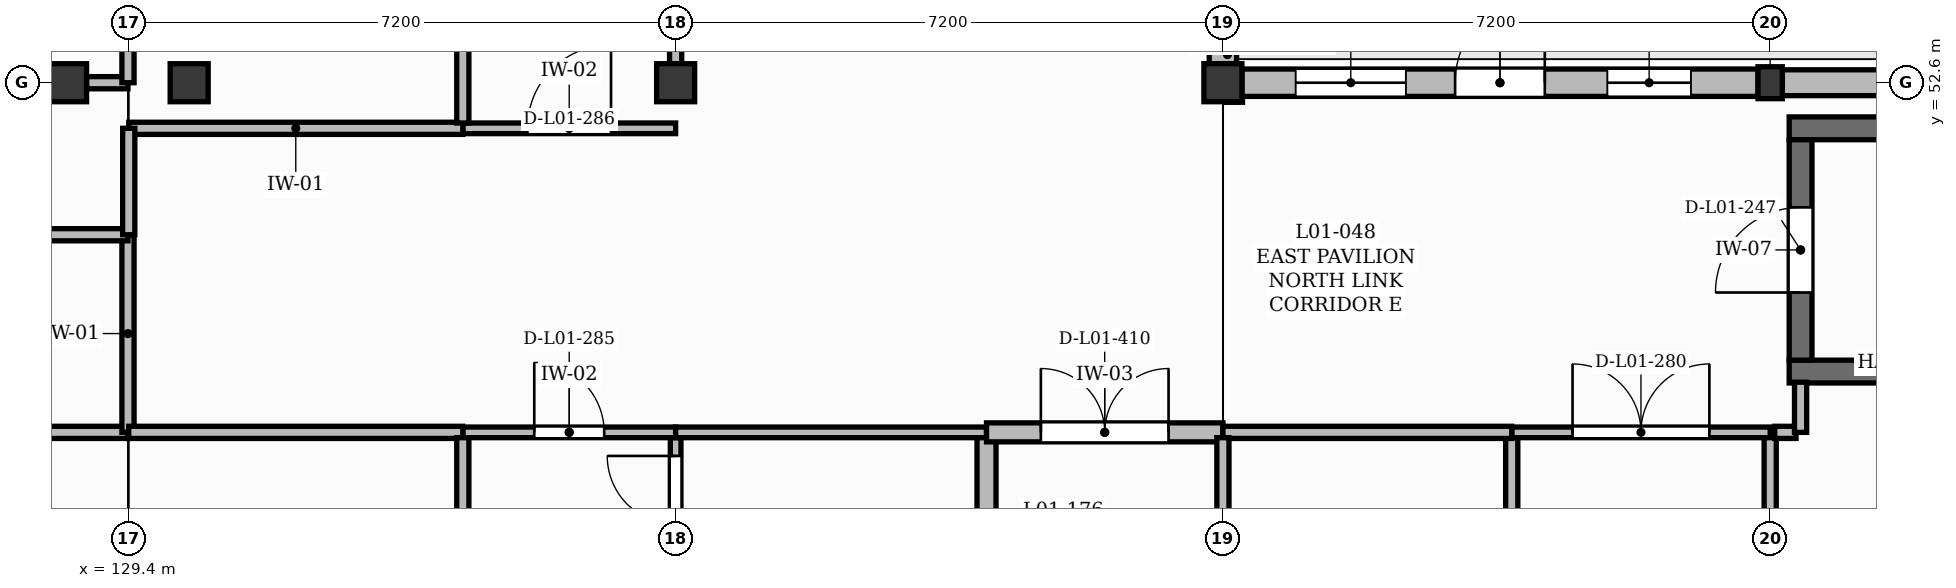
"""IFC4 building model, lengths in metres.
Left out: names, types, materials, properties, quantities, classifications, styles, units other than length and angle.
Written with IfcOpenShell. Run it as: python <this file> out.ifc"""

import sys

from ifc_helpers import new_model, si_unit, direction, frame, frame_2d, origin, origin_2d, place, context, subcontext, project, spatial, rectangle, extrude, element, fill, save


model = new_model("IFC4")
c1 = context("Model", 3, precision=1e-05, world=origin(), true_north=direction((0.0, 1.0)))
c2 = subcontext(c1, "Body", "Model", "MODEL_VIEW")
j1 = project(units=[si_unit("LENGTHUNIT", "METRE"), si_unit("PLANEANGLEUNIT", "RADIAN")], contexts=[c1])
p1 = place(None, origin())
s1 = spatial("IfcSite", under=j1, at=p1, CompositionType="ELEMENT")
p2 = place(p1, origin())
s2 = spatial("IfcBuilding", under=s1, at=p2, CompositionType="ELEMENT")
p3 = place(p2, frame((0.0, 0.0, 4.5)))
s3 = spatial("IfcBuildingStorey", under=s2, at=p3, CompositionType="ELEMENT", Elevation=4.5)
for number, where, z_axis, x_axis in (
    (1, (128.6, 52.6, 0.0), (0.0, 0.0, 1.0), (1.0, 0.0, 0.0)),
    (2, (130.2, 52.6, 0.0), (0.0, 0.0, 1.0), (1.0, 0.0, 0.0)),
    (3, (136.6, 52.6, 0.0), (0.0, 0.0, 1.0), (1.0, 0.0, 0.0)),
    (4, (143.8, 52.6, 0.0), (0.0, 0.0, 1.0), (1.0, 0.0, 0.0)),
):
    element("IfcColumn", number, at=place(p3, frame(where, z_axis=z_axis, x_axis=x_axis)), inside=s3, PredefinedType="COLUMN", context=c2, shape_type="SweptSolid", body=[
        extrude(rectangle(XDim=0.5, YDim=0.5, at=origin_2d()), origin(), (0.0, 0.0, 1.0), 4.22),
    ])
p4 = place(p3, frame((151.0, 52.6, 0.0), z_axis=(0.0, 0.0, 1.0), x_axis=(1.0, 0.0, 0.0)))
e5 = element("IfcColumn", 5, at=p4, inside=s3, PredefinedType="COLUMN", context=c2, shape_type="SweptSolid", body=[
    extrude(rectangle(XDim=0.32, YDim=0.42, at=origin_2d()), origin(), (0.0, 0.0, 1.0), 4.26),
])
p5 = place(p3, frame((143.8, 52.85, 0.0), z_axis=(0.0, 0.0, 1.0), x_axis=(0.0, 1.0, 0.0)))
e6 = element("IfcWall", 6, at=p5, inside=s3, PredefinedType="SOLIDWALL", context=c2, shape_type="SweptSolid", body=[
    extrude(rectangle(XDim=6.7, YDim=0.36, at=frame_2d((3.35, 0.0))), origin(), (0.0, 0.0, 1.0), 3.52),
])
p6 = place(p5, frame((1.9, 0.0, 1.5)))
e7 = element("IfcOpeningElement", 7, at=p6, cuts=e6, PredefinedType="OPENING", context=c2, shape_type="SweptSolid", body=[
    extrude(rectangle(XDim=1.5, YDim=1.25, at=frame_2d((0.75, 0.625))), frame((0.0, 0.19, 0.0), z_axis=(0.0, -1.0, 0.0), x_axis=(1.0, 0.0, 0.0)), (0.0, 0.0, 1.0), 0.38),
])
p7 = place(p5, frame((4.64, 0.0, 1.35)))
e8 = element("IfcOpeningElement", 8, at=p7, cuts=e6, PredefinedType="OPENING", context=c2, shape_type="SweptSolid", body=[
    extrude(rectangle(XDim=1.25, YDim=1.4, at=frame_2d((0.625, 0.7))), frame((0.0, 0.19, 0.0), z_axis=(0.0, -1.0, 0.0), x_axis=(1.0, 0.0, 0.0)), (0.0, 0.0, 1.0), 0.38),
])
p8 = place(p3, frame((144.05, 52.6, 0.0), z_axis=(0.0, 0.0, 1.0), x_axis=(1.0, 0.0, 0.0)))
e9 = element("IfcWall", 9, at=p8, inside=s3, PredefinedType="SOLIDWALL", context=c2, shape_type="SweptSolid", body=[
    extrude(rectangle(XDim=6.79, YDim=0.36, at=frame_2d((3.395, 0.0))), origin(), (0.0, 0.0, 1.0), 3.76),
])
p9 = place(p8, frame((2.805, 0.0, 0.0)))
e10 = element("IfcOpeningElement", 10, at=p9, cuts=e9, PredefinedType="OPENING", context=c2, shape_type="SweptSolid", body=[
    extrude(rectangle(XDim=1.18, YDim=2.2, at=frame_2d((0.59, 1.1))), frame((0.0, 0.19, 0.0), z_axis=(0.0, -1.0, 0.0), x_axis=(1.0, 0.0, 0.0)), (0.0, 0.0, 1.0), 0.38),
])
p10 = place(p8, frame((0.708, 0.0, 1.35)))
e11 = element("IfcOpeningElement", 11, at=p10, cuts=e9, PredefinedType="OPENING", context=c2, shape_type="SweptSolid", body=[
    extrude(rectangle(XDim=1.45, YDim=1.4, at=frame_2d((0.725, 0.7))), frame((0.0, 0.19, 0.0), z_axis=(0.0, -1.0, 0.0), x_axis=(1.0, 0.0, 0.0)), (0.0, 0.0, 1.0), 0.38),
])
p11 = place(p8, frame((4.808, 0.0, 1.0)))
e12 = element("IfcOpeningElement", 12, at=p11, cuts=e9, PredefinedType="OPENING", context=c2, shape_type="SweptSolid", body=[
    extrude(rectangle(XDim=1.1, YDim=2.2, at=frame_2d((0.55, 1.1))), frame((0.0, 0.19, 0.0), z_axis=(0.0, -1.0, 0.0), x_axis=(1.0, 0.0, 0.0)), (0.0, 0.0, 1.0), 0.38),
])
p12 = place(p3, frame((151.16, 52.6, 0.0), z_axis=(0.0, 0.0, 1.0), x_axis=(1.0, 0.0, 0.0)))
e13 = element("IfcWall", 13, at=p12, inside=s3, PredefinedType="SOLIDWALL", context=c2, shape_type="SweptSolid", body=[
    extrude(rectangle(XDim=6.86, YDim=0.34, at=frame_2d((3.43, 0.0))), origin(), (0.0, 0.0, 1.0), 3.8),
])
for number, where, z_axis, x_axis in (
    (14, (151.25, 48.8, 0.0), (0.0, 0.0, 1.0), (1.0, 0.0, 0.0)),
    (15, (151.25, 52.0, 0.0), (0.0, 0.0, 1.0), (1.0, 0.0, 0.0)),
):
    element("IfcWall", number, at=place(p3, frame(where, z_axis=z_axis, x_axis=x_axis)), inside=s3, PredefinedType="SHEAR", context=c2, shape_type="SweptSolid", body=[
        extrude(rectangle(XDim=6.7, YDim=0.3, at=frame_2d((3.35, 0.0))), origin(), (0.0, 0.0, 1.0), 4.25),
    ])
p13 = place(p3, frame((151.4, 48.95, 0.0), z_axis=(0.0, 0.0, 1.0), x_axis=(0.0, 1.0, 0.0)))
e16 = element("IfcWall", 16, at=p13, inside=s3, PredefinedType="SHEAR", context=c2, shape_type="SweptSolid", body=[
    extrude(rectangle(XDim=2.9, YDim=0.3, at=frame_2d((1.45, 0.0))), origin(), (0.0, 0.0, 1.0), 4.25),
])
p14 = place(p13, frame((0.89, 0.0, 0.0)))
e17 = element("IfcOpeningElement", 17, at=p14, cuts=e16, PredefinedType="OPENING", context=c2, shape_type="SweptSolid", body=[
    extrude(rectangle(XDim=1.12, YDim=2.1, at=frame_2d((0.56, 1.05))), frame((0.0, 0.16, 0.0), z_axis=(0.0, -1.0, 0.0), x_axis=(1.0, 0.0, 0.0)), (0.0, 0.0, 1.0), 0.32),
])
p15 = place(p3, frame((133.8, 48.0, 0.0), z_axis=(0.0, 0.0, 1.0), x_axis=(1.0, 0.0, 0.0)))
e18 = element("IfcWall", 18, at=p15, inside=s3, PredefinedType="PARTITIONING", context=c2, shape_type="SweptSolid", body=[
    extrude(rectangle(XDim=2.8, YDim=0.14, at=frame_2d((1.4, 0.0))), origin(), (0.0, 0.0, 1.0), 4.18),
])
p16 = place(p15, frame((0.94, 0.0, 0.0)))
e19 = element("IfcOpeningElement", 19, at=p16, cuts=e18, PredefinedType="OPENING", context=c2, shape_type="SweptSolid", body=[
    extrude(rectangle(XDim=0.92, YDim=2.1, at=frame_2d((0.46, 1.05))), frame((0.0, 0.08, 0.0), z_axis=(0.0, -1.0, 0.0), x_axis=(1.0, 0.0, 0.0)), (0.0, 0.0, 1.0), 0.16),
])
p17 = place(p3, frame((133.8, 52.0, 0.0), z_axis=(0.0, 0.0, 1.0), x_axis=(1.0, 0.0, 0.0)))
e20 = element("IfcWall", 20, at=p17, inside=s3, PredefinedType="PARTITIONING", context=c2, shape_type="SweptSolid", body=[
    extrude(rectangle(XDim=2.8, YDim=0.14, at=frame_2d((1.4, 0.0))), origin(), (0.0, 0.0, 1.0), 4.18),
])
p18 = place(p17, frame((0.85, 0.0, 0.0)))
e21 = element("IfcOpeningElement", 21, at=p18, cuts=e20, PredefinedType="OPENING", context=c2, shape_type="SweptSolid", body=[
    extrude(rectangle(XDim=1.1, YDim=2.1, at=frame_2d((0.55, 1.05))), frame((0.0, 0.08, 0.0), z_axis=(0.0, -1.0, 0.0), x_axis=(1.0, 0.0, 0.0)), (0.0, 0.0, 1.0), 0.16),
])
p19 = place(p3, frame((136.6, 45.65, 0.0), z_axis=(0.0, 0.0, 1.0), x_axis=(0.0, 1.0, 0.0)))
e22 = element("IfcWall", 22, at=p19, inside=s3, PredefinedType="PARTITIONING", context=c2, shape_type="SweptSolid", body=[
    extrude(rectangle(XDim=2.28, YDim=0.14, at=frame_2d((1.14, 0.0))), origin(), (0.0, 0.0, 1.0), 3.52),
])
p20 = place(p19, frame((0.24, 0.0, 0.0)))
e23 = element("IfcOpeningElement", 23, at=p20, cuts=e22, PredefinedType="OPENING", context=c2, shape_type="SweptSolid", body=[
    extrude(rectangle(XDim=1.8, YDim=2.3, at=frame_2d((0.9, 1.15))), frame((0.0, 0.08, 0.0), z_axis=(0.0, -1.0, 0.0), x_axis=(1.0, 0.0, 0.0)), (0.0, 0.0, 1.0), 0.16),
])
p21 = place(p3, frame((136.6, 48.0, 0.0), z_axis=(0.0, 0.0, 1.0), x_axis=(1.0, 0.0, 0.0)))
e24 = element("IfcWall", 24, at=p21, inside=s3, PredefinedType="PARTITIONING", context=c2, shape_type="SweptSolid", body=[
    extrude(rectangle(XDim=4.09, YDim=0.14, at=frame_2d((2.045, 0.0))), origin(), (0.0, 0.0, 1.0), 4.18),
])
p22 = place(p3, frame((140.69, 45.47, 0.0), z_axis=(0.0, 0.0, 1.0), x_axis=(0.0, 1.0, 0.0)))
e25 = element("IfcWall", 25, at=p22, inside=s3, PredefinedType="SOLIDWALL", context=c2, shape_type="SweptSolid", body=[
    extrude(rectangle(XDim=2.46, YDim=0.25, at=frame_2d((1.23, 0.0))), origin(), (0.0, 0.0, 1.0), 4.18),
])
p23 = place(p3, frame((140.69, 48.0, 0.0), z_axis=(0.0, 0.0, 1.0), x_axis=(1.0, 0.0, 0.0)))
e26 = element("IfcWall", 26, at=p23, inside=s3, PredefinedType="SOLIDWALL", context=c2, shape_type="SweptSolid", body=[
    extrude(rectangle(XDim=3.11, YDim=0.25, at=frame_2d((1.555, 0.0))), origin(), (0.0, 0.0, 1.0), 4.18),
])
p24 = place(p23, frame((0.715, 0.0, 0.0)))
e27 = element("IfcOpeningElement", 27, at=p24, cuts=e26, PredefinedType="OPENING", context=c2, shape_type="SweptSolid", body=[
    extrude(rectangle(XDim=1.68, YDim=2.3, at=frame_2d((0.84, 1.15))), frame((0.0, 0.135, 0.0), z_axis=(0.0, -1.0, 0.0), x_axis=(1.0, 0.0, 0.0)), (0.0, 0.0, 1.0), 0.27),
])
p25 = place(p3, frame((147.6, 48.0, 0.0), z_axis=(0.0, 0.0, 1.0), x_axis=(1.0, 0.0, 0.0)))
e28 = element("IfcWall", 28, at=p25, inside=s3, PredefinedType="PARTITIONING", context=c2, shape_type="SweptSolid", body=[
    extrude(rectangle(XDim=3.4, YDim=0.14, at=frame_2d((1.7, 0.0))), origin(), (0.0, 0.0, 1.0), 4.18),
])
p26 = place(p25, frame((0.8, 0.0, 0.0)))
e29 = element("IfcOpeningElement", 29, at=p26, cuts=e28, PredefinedType="OPENING", context=c2, shape_type="SweptSolid", body=[
    extrude(rectangle(XDim=1.8, YDim=2.3, at=frame_2d((0.9, 1.15))), frame((0.0, 0.08, 0.0), z_axis=(0.0, -1.0, 0.0), x_axis=(1.0, 0.0, 0.0)), (0.0, 0.0, 1.0), 0.16),
])
p27 = place(p3, frame((151.0, 45.58, 0.0), z_axis=(0.0, 0.0, 1.0), x_axis=(0.0, 1.0, 0.0)))
e30 = element("IfcWall", 30, at=p27, inside=s3, PredefinedType="PARTITIONING", context=c2, shape_type="SweptSolid", body=[
    extrude(rectangle(XDim=2.35, YDim=0.16, at=frame_2d((1.175, 0.0))), origin(), (0.0, 0.0, 1.0), 3.74),
])
p28 = place(p3, frame((147.6, 45.4, 0.0), z_axis=(0.0, 0.0, 1.0), x_axis=(0.0, 1.0, 0.0)))
e31 = element("IfcWall", 31, at=p28, inside=s3, PredefinedType="PARTITIONING", context=c2, shape_type="SweptSolid", body=[
    extrude(rectangle(XDim=2.53, YDim=0.16, at=frame_2d((1.265, 0.0))), origin(), (0.0, 0.0, 1.0), 4.18),
])
p29 = place(p3, frame((124.6, 48.0, 0.0), z_axis=(0.0, 0.0, 1.0), x_axis=(1.0, 0.0, 0.0)))
e32 = element("IfcWall", 32, at=p29, inside=s3, PredefinedType="PARTITIONING", context=c2, shape_type="SweptSolid", body=[
    extrude(rectangle(XDim=4.795, YDim=0.16, at=frame_2d((2.397, 0.0))), origin(), (0.0, 0.0, 1.0), 4.18),
])
p30 = place(p3, frame((129.395, 48.0, 0.0), z_axis=(0.0, 0.0, 1.0), x_axis=(0.0, 1.0, 0.0)))
e33 = element("IfcWall", 33, at=p30, inside=s3, PredefinedType="PARTITIONING", context=c2, shape_type="SweptSolid", body=[
    extrude(rectangle(XDim=2.6, YDim=0.16, at=frame_2d((1.3, 0.0))), origin(), (0.0, 0.0, 1.0), 4.18),
])
p31 = place(p3, frame((129.395, 50.6, 0.0), z_axis=(0.0, 0.0, 1.0), x_axis=(-1.0, 0.0, 0.0)))
e34 = element("IfcWall", 34, at=p31, inside=s3, PredefinedType="PARTITIONING", context=c2, shape_type="SweptSolid", body=[
    extrude(rectangle(XDim=4.795, YDim=0.16, at=frame_2d((2.397, 0.0))), origin(), (0.0, 0.0, 1.0), 4.18),
])
p32 = place(p3, frame((129.405, 48.0, 0.0), z_axis=(0.0, 0.0, 1.0), x_axis=(1.0, 0.0, 0.0)))
e35 = element("IfcWall", 35, at=p32, inside=s3, PredefinedType="PARTITIONING", context=c2, shape_type="SweptSolid", body=[
    extrude(rectangle(XDim=4.395, YDim=0.16, at=frame_2d((2.198, 0.0))), origin(), (0.0, 0.0, 1.0), 4.18),
])
p33 = place(p3, frame((143.8, 48.0, 0.0), z_axis=(0.0, 0.0, 1.0), x_axis=(1.0, 0.0, 0.0)))
e36 = element("IfcWall", 36, at=p33, inside=s3, PredefinedType="PARTITIONING", context=c2, shape_type="SweptSolid", body=[
    extrude(rectangle(XDim=3.8, YDim=0.16, at=frame_2d((1.9, 0.0))), origin(), (0.0, 0.0, 1.0), 4.18),
])
p34 = place(p3, frame((151.06, 48.0, 0.0), z_axis=(0.0, 0.0, 1.0), x_axis=(1.0, 0.0, 0.0)))
e37 = element("IfcWall", 37, at=p34, inside=s3, PredefinedType="PARTITIONING", context=c2, shape_type="SweptSolid", body=[
    extrude(rectangle(XDim=0.28, YDim=0.16, at=frame_2d((0.14, 0.0))), origin(), (0.0, 0.0, 1.0), 4.18),
])
p35 = place(p3, frame((151.4, 48.0, 0.0), z_axis=(0.0, 0.0, 1.0), x_axis=(0.0, 1.0, 0.0)))
e38 = element("IfcWall", 38, at=p35, inside=s3, PredefinedType="PARTITIONING", context=c2, shape_type="SweptSolid", body=[
    extrude(rectangle(XDim=0.66, YDim=0.16, at=frame_2d((0.33, 0.0))), origin(), (0.0, 0.0, 1.0), 4.18),
])
p36 = place(p3, frame((133.8, 52.0, 0.0), z_axis=(0.0, 0.0, 1.0), x_axis=(-1.0, 0.0, 0.0)))
e39 = element("IfcWall", 39, at=p36, inside=s3, PredefinedType="PARTITIONING", context=c2, shape_type="SweptSolid", body=[
    extrude(rectangle(XDim=4.395, YDim=0.16, at=frame_2d((2.198, 0.0))), origin(), (0.0, 0.0, 1.0), 4.18),
])
p37 = place(p3, frame((129.405, 50.6, 0.0), z_axis=(0.0, 0.0, 1.0), x_axis=(0.0, 1.0, 0.0)))
e40 = element("IfcWall", 40, at=p37, inside=s3, PredefinedType="PARTITIONING", context=c2, shape_type="SweptSolid", body=[
    extrude(rectangle(XDim=1.4, YDim=0.16, at=frame_2d((0.7, 0.0))), origin(), (0.0, 0.0, 1.0), 4.18),
])
p38 = place(p3, frame((133.8, 45.4, 0.0), z_axis=(0.0, 0.0, 1.0), x_axis=(0.0, 1.0, 0.0)))
e41 = element("IfcWall", 41, at=p38, inside=s3, PredefinedType="PARTITIONING", context=c2, shape_type="SweptSolid", body=[
    extrude(rectangle(XDim=2.53, YDim=0.16, at=frame_2d((1.265, 0.0))), origin(), (0.0, 0.0, 1.0), 4.18),
])
p39 = place(p3, frame((136.6, 52.85, 0.0), z_axis=(0.0, 0.0, 1.0), x_axis=(0.0, 1.0, 0.0)))
e42 = element("IfcWall", 42, at=p39, inside=s3, PredefinedType="PARTITIONING", context=c2, shape_type="SweptSolid", body=[
    extrude(rectangle(XDim=1.35, YDim=0.16, at=frame_2d((0.675, 0.0))), origin(), (0.0, 0.0, 1.0), 3.52),
])
p40 = place(p3, frame((133.8, 52.07, 0.0), z_axis=(0.0, 0.0, 1.0), x_axis=(0.0, 1.0, 0.0)))
e43 = element("IfcWall", 43, at=p40, inside=s3, PredefinedType="PARTITIONING", context=c2, shape_type="SweptSolid", body=[
    extrude(rectangle(XDim=2.13, YDim=0.16, at=frame_2d((1.065, 0.0))), origin(), (0.0, 0.0, 1.0), 4.18),
])
p41 = place(p3, frame((128.85, 52.6, 0.0), z_axis=(0.0, 0.0, 1.0), x_axis=(1.0, 0.0, 0.0)))
e44 = element("IfcWall", 44, at=p41, inside=s3, PredefinedType="PARTITIONING", context=c2, shape_type="SweptSolid", body=[
    extrude(rectangle(XDim=0.545, YDim=0.16, at=frame_2d((0.272, 0.0))), origin(), (0.0, 0.0, 1.0), 4.18),
])
p42 = place(p3, frame((129.395, 52.6, 0.0), z_axis=(0.0, 0.0, 1.0), x_axis=(0.0, 1.0, 0.0)))
e45 = element("IfcWall", 45, at=p42, inside=s3, PredefinedType="PARTITIONING", context=c2, shape_type="SweptSolid", body=[
    extrude(rectangle(XDim=1.6, YDim=0.16, at=frame_2d((0.8, 0.0))), origin(), (0.0, 0.0, 1.0), 4.18),
])
p43 = place(p3, frame((143.8, 45.65, 0.0), z_axis=(0.0, 0.0, 1.0), x_axis=(0.0, 1.0, 0.0)))
e46 = element("IfcWall", 46, at=p43, inside=s3, PredefinedType="PARTITIONING", context=c2, shape_type="SweptSolid", body=[
    extrude(rectangle(XDim=2.28, YDim=0.16, at=frame_2d((1.14, 0.0))), origin(), (0.0, 0.0, 1.0), 3.52),
])
p44 = place(p9, origin())
e47 = element("IfcDoor", 47, at=p44, inside=s3, OperationType="SINGLE_SWING_RIGHT", PredefinedType="DOOR", context=c2, shape_type="SweptSolid", body=[
    extrude(rectangle(XDim=1.18, YDim=2.2, at=frame_2d((0.59, 1.1))), frame((0.0, 0.025, 0.0), z_axis=(0.0, -1.0, 0.0), x_axis=(1.0, 0.0, 0.0)), (0.0, 0.0, 1.0), 0.05),
])
fill(e10, e47)
p45 = place(p10, origin())
e48 = element("IfcWindow", 48, at=p45, inside=s3, PartitioningType="SINGLE_PANEL", PredefinedType="WINDOW", context=c2, shape_type="SweptSolid", body=[
    extrude(rectangle(XDim=1.45, YDim=1.4, at=frame_2d((0.725, 0.7))), frame((0.0, 0.03, 0.0), z_axis=(0.0, -1.0, 0.0), x_axis=(1.0, 0.0, 0.0)), (0.0, 0.0, 1.0), 0.06),
])
fill(e11, e48)
p46 = place(p11, origin())
e49 = element("IfcWindow", 49, at=p46, inside=s3, PartitioningType="SINGLE_PANEL", PredefinedType="WINDOW", context=c2, shape_type="SweptSolid", body=[
    extrude(rectangle(XDim=1.1, YDim=2.2, at=frame_2d((0.55, 1.1))), frame((0.0, 0.03, 0.0), z_axis=(0.0, -1.0, 0.0), x_axis=(1.0, 0.0, 0.0)), (0.0, 0.0, 1.0), 0.06),
])
fill(e12, e49)
p47 = place(p14, origin())
e50 = element("IfcDoor", 50, at=p47, inside=s3, OperationType="SINGLE_SWING_LEFT", PredefinedType="DOOR", context=c2, shape_type="SweptSolid", body=[
    extrude(rectangle(XDim=1.12, YDim=2.1, at=frame_2d((0.56, 1.05))), frame((0.0, 0.025, 0.0), z_axis=(0.0, -1.0, 0.0), x_axis=(1.0, 0.0, 0.0)), (0.0, 0.0, 1.0), 0.05),
])
fill(e17, e50)
p48 = place(p26, origin())
e51 = element("IfcDoor", 51, at=p48, inside=s3, OperationType="DOUBLE_DOOR_SINGLE_SWING", PredefinedType="DOOR", context=c2, shape_type="SweptSolid", body=[
    extrude(rectangle(XDim=1.8, YDim=2.3, at=frame_2d((0.9, 1.15))), frame((0.0, 0.025, 0.0), z_axis=(0.0, -1.0, 0.0), x_axis=(1.0, 0.0, 0.0)), (0.0, 0.0, 1.0), 0.05),
])
fill(e29, e51)
p49 = place(p16, origin())
e52 = element("IfcDoor", 52, at=p49, inside=s3, OperationType="SINGLE_SWING_LEFT", PredefinedType="DOOR", context=c2, shape_type="SweptSolid", body=[
    extrude(rectangle(XDim=0.92, YDim=2.1, at=frame_2d((0.46, 1.05))), frame((0.0, 0.025, 0.0), z_axis=(0.0, -1.0, 0.0), x_axis=(1.0, 0.0, 0.0)), (0.0, 0.0, 1.0), 0.05),
])
fill(e19, e52)
p50 = place(p18, origin())
e53 = element("IfcDoor", 53, at=p50, inside=s3, OperationType="SINGLE_SWING_RIGHT", PredefinedType="DOOR", context=c2, shape_type="SweptSolid", body=[
    extrude(rectangle(XDim=1.1, YDim=2.1, at=frame_2d((0.55, 1.05))), frame((0.0, 0.025, 0.0), z_axis=(0.0, -1.0, 0.0), x_axis=(1.0, 0.0, 0.0)), (0.0, 0.0, 1.0), 0.05),
])
fill(e21, e53)
p51 = place(p20, origin())
e54 = element("IfcDoor", 54, at=p51, inside=s3, OperationType="DOUBLE_DOOR_SINGLE_SWING", PredefinedType="DOOR", context=c2, shape_type="SweptSolid", body=[
    extrude(rectangle(XDim=1.8, YDim=2.3, at=frame_2d((0.9, 1.15))), frame((0.0, 0.025, 0.0), z_axis=(0.0, -1.0, 0.0), x_axis=(1.0, 0.0, 0.0)), (0.0, 0.0, 1.0), 0.05),
])
fill(e23, e54)
p52 = place(p24, origin())
e55 = element("IfcDoor", 55, at=p52, inside=s3, OperationType="DOUBLE_DOOR_SINGLE_SWING", PredefinedType="DOOR", context=c2, shape_type="SweptSolid", body=[
    extrude(rectangle(XDim=1.68, YDim=2.3, at=frame_2d((0.84, 1.15))), frame((0.0, 0.025, 0.0), z_axis=(0.0, -1.0, 0.0), x_axis=(1.0, 0.0, 0.0)), (0.0, 0.0, 1.0), 0.05),
])
fill(e27, e55)
save(model, sys.argv[1])
